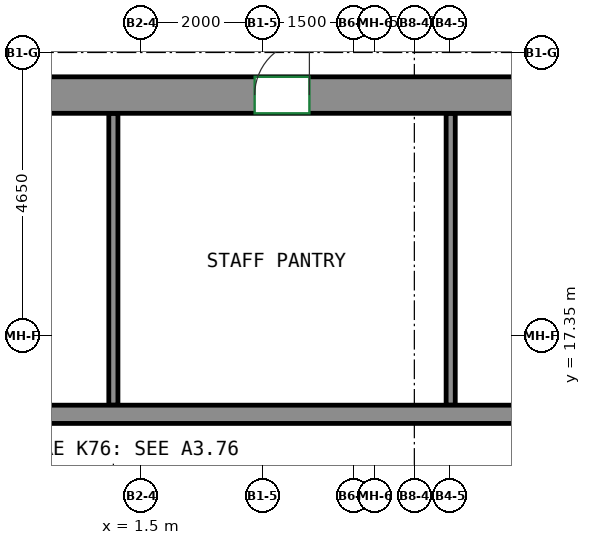
"""IFC4 building model, lengths in metres.
Left out: names, types, materials, properties, quantities, classifications, styles, units other than length and angle.
Written with IfcOpenShell. Run it as: python <this file> out.ifc"""

import sys

from ifc_helpers import new_model, si_unit, direction, frame, frame_2d, origin, place, context, subcontext, project, spatial, rectangle, extrude, source, transform, mapped, element, fill, save


model = new_model("IFC4")
c1 = context("Model", 3, precision=1e-05, world=origin(), true_north=direction((0.0, 1.0)))
c2 = subcontext(c1, "Body", "Model", "MODEL_VIEW")
j1 = project(units=[si_unit("LENGTHUNIT", "METRE"), si_unit("PLANEANGLEUNIT", "RADIAN")], contexts=[c1])
p1 = place(None, origin())
s1 = spatial("IfcSite", under=j1, at=p1, CompositionType="ELEMENT")
p2 = place(p1, origin())
s2 = spatial("IfcBuilding", under=s1, at=p2, CompositionType="ELEMENT")
p3 = place(p2, frame((0.0, 0.0, 301.8)))
s3 = spatial("IfcBuildingStorey", under=s2, at=p3, CompositionType="ELEMENT", Elevation=301.8)
m1 = source(origin(), c2, "Body", "SweptSolid", [
    extrude(rectangle(XDim=33.3, YDim=0.6, at=frame_2d((16.65, 0.0))), origin(), (0.0, 0.0, 1.0), 3.12),
])
p4 = place(p3, frame((-15.6, 21.3, 0.0), z_axis=(0.0, 0.0, 1.0), x_axis=(1.0, 0.0, 0.0)))
e1 = element("IfcWall", 1, at=p4, inside=s3, PredefinedType="SHEAR", context=c2, shape_type="MappedRepresentation", body=[
    mapped(m1, transform((0.0, 0.0, 0.0))),
])
p5 = place(p4, frame((8.12, 0.0, 0.0)))
e2 = element("IfcOpeningElement", 2, at=p5, cuts=e1, PredefinedType="OPENING", context=c2, shape_type="SweptSolid", body=[
    extrude(rectangle(XDim=0.9, YDim=2.1, at=frame_2d((0.45, 1.05))), frame((0.0, 0.31, 0.0), z_axis=(0.0, -1.0, 0.0), x_axis=(1.0, 0.0, 0.0)), (0.0, 0.0, 1.0), 0.62),
])
p6 = place(p4, frame((14.15, 0.0, 0.0)))
e3 = element("IfcOpeningElement", 3, at=p6, cuts=e1, PredefinedType="OPENING", context=c2, shape_type="SweptSolid", body=[
    extrude(rectangle(XDim=0.9, YDim=2.1, at=frame_2d((0.45, 1.05))), frame((0.0, 0.31, 0.0), z_axis=(0.0, -1.0, 0.0), x_axis=(1.0, 0.0, 0.0)), (0.0, 0.0, 1.0), 0.62),
])
p7 = place(p4, frame((18.974, 0.0, 0.0)))
e4 = element("IfcOpeningElement", 4, at=p7, cuts=e1, PredefinedType="OPENING", context=c2, shape_type="SweptSolid", body=[
    extrude(rectangle(XDim=0.9, YDim=2.1, at=frame_2d((0.45, 1.05))), frame((0.0, 0.31, 0.0), z_axis=(0.0, -1.0, 0.0), x_axis=(1.0, 0.0, 0.0)), (0.0, 0.0, 1.0), 0.62),
])
p8 = place(p4, frame((23.664, 0.0, 0.0)))
e5 = element("IfcOpeningElement", 5, at=p8, cuts=e1, PredefinedType="OPENING", context=c2, shape_type="SweptSolid", body=[
    extrude(rectangle(XDim=0.9, YDim=2.1, at=frame_2d((0.45, 1.05))), frame((0.0, 0.31, 0.0), z_axis=(0.0, -1.0, 0.0), x_axis=(1.0, 0.0, 0.0)), (0.0, 0.0, 1.0), 0.62),
])
p9 = place(p4, frame((26.92, 0.0, 0.0)))
e6 = element("IfcOpeningElement", 6, at=p9, cuts=e1, PredefinedType="OPENING", context=c2, shape_type="SweptSolid", body=[
    extrude(rectangle(XDim=0.9, YDim=2.1, at=frame_2d((0.45, 1.05))), frame((0.0, 0.31, 0.0), z_axis=(0.0, -1.0, 0.0), x_axis=(1.0, 0.0, 0.0)), (0.0, 0.0, 1.0), 0.62),
])
p10 = place(p4, frame((2.125, 0.0, 0.0)))
e7 = element("IfcOpeningElement", 7, at=p10, cuts=e1, PredefinedType="OPENING", context=c2, shape_type="SweptSolid", body=[
    extrude(rectangle(XDim=0.9, YDim=2.1, at=frame_2d((0.45, 1.05))), frame((0.0, 0.31, 0.0), z_axis=(0.0, -1.0, 0.0), x_axis=(1.0, 0.0, 0.0)), (0.0, 0.0, 1.0), 0.62),
])
p11 = place(p4, frame((30.275, 0.0, 0.0)))
e8 = element("IfcOpeningElement", 8, at=p11, cuts=e1, PredefinedType="OPENING", context=c2, shape_type="SweptSolid", body=[
    extrude(rectangle(XDim=0.9, YDim=2.1, at=frame_2d((0.45, 1.05))), frame((0.0, 0.31, 0.0), z_axis=(0.0, -1.0, 0.0), x_axis=(1.0, 0.0, 0.0)), (0.0, 0.0, 1.0), 0.62),
])
m2 = source(origin(), c2, "Body", "SweptSolid", [
    extrude(rectangle(XDim=22.08, YDim=0.3, at=frame_2d((11.04, 0.0))), origin(), (0.0, 0.0, 1.0), 3.12),
])
p12 = place(p3, frame((-11.01, 16.05, 0.0), z_axis=(0.0, 0.0, 1.0), x_axis=(1.0, 0.0, 0.0)))
e9 = element("IfcWall", 9, at=p12, inside=s3, PredefinedType="SHEAR", context=c2, shape_type="MappedRepresentation", body=[
    mapped(m2, transform((0.0, 0.0, 0.0))),
])
m3 = source(origin(), c2, "Body", "SweptSolid", [
    extrude(rectangle(XDim=4.8, YDim=0.15, at=frame_2d((2.4, 0.0))), origin(), (0.0, 0.0, 1.0), 3.12),
])
for number, where, z_axis, x_axis in (
    (10, (1.05, 16.2, 0.0), (0.0, 0.0, 1.0), (0.0, 1.0, 0.0)),
    (11, (6.598, 16.2, 0.0), (0.0, 0.0, 1.0), (0.0, 1.0, 0.0)),
):
    element("IfcWall", number, at=place(p3, frame(where, z_axis=z_axis, x_axis=x_axis)), inside=s3, PredefinedType="PARTITIONING", context=c2, shape_type="MappedRepresentation", body=[
        mapped(m3, transform((0.0, 0.0, 0.0))),
    ])
p13 = place(p7, origin())
e12 = element("IfcDoor", 12, at=p13, inside=s3, OperationType="SINGLE_SWING_RIGHT", PredefinedType="DOOR", context=c2, shape_type="SweptSolid", body=[
    extrude(rectangle(XDim=0.9, YDim=2.1, at=frame_2d((0.45, 1.05))), frame((0.0, -0.155, 0.0), z_axis=(0.0, -1.0, 0.0), x_axis=(1.0, 0.0, 0.0)), (0.0, 0.0, 1.0), 0.05),
])
fill(e4, e12)
save(model, sys.argv[1])
